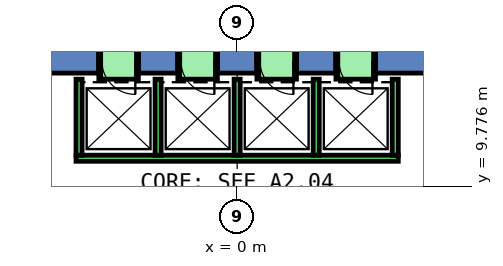
"""IFC4 building model, lengths in metres.
Left out: names, types, materials, properties, quantities, classifications, styles, units other than length and angle.
Written with IfcOpenShell. Run it as: python <this file> out.ifc"""

import sys

from ifc_helpers import new_model, si_unit, direction, frame, frame_2d, origin, place, context, subcontext, project, spatial, polyline, rectangle, outline, extrude, element, fill, save


model = new_model("IFC4")
c1 = context("Model", 3, precision=1e-05, world=origin(), true_north=direction((0.0, 1.0)))
c2 = subcontext(c1, "Body", "Model", "MODEL_VIEW")
j1 = project(units=[si_unit("LENGTHUNIT", "METRE"), si_unit("PLANEANGLEUNIT", "RADIAN")], contexts=[c1])
p1 = place(None, origin())
s1 = spatial("IfcSite", under=j1, at=p1, CompositionType="ELEMENT")
p2 = place(p1, origin())
s2 = spatial("IfcBuilding", under=s1, at=p2, CompositionType="ELEMENT")
p3 = place(p2, origin())
s3 = spatial("IfcBuildingStorey", under=s2, at=p3, CompositionType="ELEMENT", Elevation=0.0)
p4 = place(p3, frame((0.0, 0.0, -0.5)))
e1 = element("IfcWall", 1, at=p4, inside=s3, PredefinedType="SHEAR", context=c2, shape_type="SweptSolid", body=[
    extrude(outline(polyline([(4.55, 14.5), (4.55, 13.5), (6.351, 13.5), (6.928, 14.5), (4.55, 14.5)])), origin(), (0.0, 0.0, 1.0), 9.05),
])
p5 = place(p3, frame((0.0, 0.0, -0.5)))
e2 = element("IfcWall", 2, at=p5, inside=s3, PredefinedType="SHEAR", context=c2, shape_type="SweptSolid", body=[
    extrude(outline(polyline([(1.95, 14.5), (1.95, 13.5), (3.25, 13.5), (3.25, 14.5), (1.95, 14.5)])), origin(), (0.0, 0.0, 1.0), 9.05),
])
p6 = place(p3, frame((0.0, 0.0, -0.5)))
e3 = element("IfcWall", 3, at=p6, inside=s3, PredefinedType="SHEAR", context=c2, shape_type="SweptSolid", body=[
    extrude(outline(polyline([(-0.65, 14.5), (-0.65, 13.5), (0.65, 13.5), (0.65, 14.5), (-0.65, 14.5)])), origin(), (0.0, 0.0, 1.0), 9.05),
])
p7 = place(p3, frame((0.0, 0.0, -0.5)))
e4 = element("IfcWall", 4, at=p7, inside=s3, PredefinedType="SHEAR", context=c2, shape_type="SweptSolid", body=[
    extrude(outline(polyline([(-3.25, 14.5), (-3.25, 13.5), (-1.95, 13.5), (-1.95, 14.5), (-3.25, 14.5)])), origin(), (0.0, 0.0, 1.0), 9.05),
])
p8 = place(p3, frame((0.0, 0.0, -0.5)))
e5 = element("IfcWall", 5, at=p8, inside=s3, PredefinedType="SHEAR", context=c2, shape_type="SweptSolid", body=[
    extrude(outline(polyline([(-4.55, 13.5), (-4.55, 14.5), (-6.928, 14.5), (-6.351, 13.5), (-4.55, 13.5)])), origin(), (0.0, 0.0, 1.0), 9.05),
])
p9 = place(p3, frame((0.0, 0.0, 3.6)))
e6 = element("IfcWall", 6, at=p9, inside=s3, PredefinedType="SHEAR", context=c2, shape_type="SweptSolid", body=[
    extrude(outline(polyline([(3.25, 14.5), (3.25, 13.5), (4.55, 13.5), (4.55, 14.5), (3.25, 14.5)])), origin(), (0.0, 0.0, 1.0), 4.95),
])
p10 = place(p3, frame((0.0, 0.0, 3.6)))
e7 = element("IfcWall", 7, at=p10, inside=s3, PredefinedType="SHEAR", context=c2, shape_type="SweptSolid", body=[
    extrude(outline(polyline([(0.65, 14.5), (0.65, 13.5), (1.95, 13.5), (1.95, 14.5), (0.65, 14.5)])), origin(), (0.0, 0.0, 1.0), 4.95),
])
p11 = place(p3, frame((0.0, 0.0, 3.6)))
e8 = element("IfcWall", 8, at=p11, inside=s3, PredefinedType="SHEAR", context=c2, shape_type="SweptSolid", body=[
    extrude(outline(polyline([(-1.95, 14.5), (-1.95, 13.5), (-0.65, 13.5), (-0.65, 14.5), (-1.95, 14.5)])), origin(), (0.0, 0.0, 1.0), 4.95),
])
p12 = place(p3, frame((0.0, 0.0, 3.6)))
e9 = element("IfcWall", 9, at=p12, inside=s3, PredefinedType="SHEAR", context=c2, shape_type="SweptSolid", body=[
    extrude(outline(polyline([(-4.55, 14.5), (-4.55, 13.5), (-3.25, 13.5), (-3.25, 14.5), (-4.55, 14.5)])), origin(), (0.0, 0.0, 1.0), 4.95),
])
p13 = place(p3, frame((5.3, 10.7, 0.0), z_axis=(0.0, 0.0, 1.0), x_axis=(-1.0, 0.0, 0.0)))
e10 = element("IfcWall", 10, at=p13, inside=s3, PredefinedType="STANDARD", context=c2, shape_type="SweptSolid", body=[
    extrude(rectangle(XDim=10.6, YDim=0.2, at=frame_2d((5.3, 0.0))), origin(), (0.0, 0.0, 1.0), 8.55),
])
for number, where, z_axis, x_axis in (
    (11, (5.2, 10.8, 0.0), (0.0, 0.0, 1.0), (0.0, 1.0, 0.0)),
    (12, (2.6, 10.8, 0.0), (0.0, 0.0, 1.0), (0.0, 1.0, 0.0)),
    (13, (0.0, 10.8, 0.0), (0.0, 0.0, 1.0), (0.0, 1.0, 0.0)),
    (14, (-2.6, 10.8, 0.0), (0.0, 0.0, 1.0), (0.0, 1.0, 0.0)),
    (15, (-5.2, 10.8, 0.0), (0.0, 0.0, 1.0), (0.0, 1.0, 0.0)),
):
    element("IfcWall", number, at=place(p3, frame(where, z_axis=z_axis, x_axis=x_axis)), inside=s3, PredefinedType="STANDARD", context=c2, shape_type="SweptSolid", body=[
        extrude(rectangle(XDim=2.5, YDim=0.2, at=frame_2d((1.25, 0.0))), origin(), (0.0, 0.0, 1.0), 8.55),
    ])
p14 = place(p3, frame((4.55, 13.9, 0.0), z_axis=(0.0, 0.0, 1.0), x_axis=(-1.0, 0.0, 0.0)))
e16 = element("IfcWall", 16, at=p14, inside=s3, PredefinedType="STANDARD", context=c2, shape_type="SweptSolid", body=[
    extrude(rectangle(XDim=1.3, YDim=1.2, at=frame_2d((0.65, 0.0))), origin(), (0.0, 0.0, 1.0), 2.4),
])
p15 = place(p14, frame((0.1, 0.0, 0.0)))
e17 = element("IfcOpeningElement", 17, at=p15, cuts=e16, PredefinedType="OPENING", context=c2, shape_type="SweptSolid", body=[
    extrude(rectangle(XDim=1.1, YDim=2.3, at=frame_2d((0.55, 1.15))), frame((0.0, 0.61, 0.0), z_axis=(0.0, -1.0, 0.0), x_axis=(1.0, 0.0, 0.0)), (0.0, 0.0, 1.0), 1.22),
])
p16 = place(p3, frame((1.95, 13.9, 0.0), z_axis=(0.0, 0.0, 1.0), x_axis=(-1.0, 0.0, 0.0)))
e18 = element("IfcWall", 18, at=p16, inside=s3, PredefinedType="STANDARD", context=c2, shape_type="SweptSolid", body=[
    extrude(rectangle(XDim=1.3, YDim=1.2, at=frame_2d((0.65, 0.0))), origin(), (0.0, 0.0, 1.0), 2.4),
])
p17 = place(p16, frame((0.1, 0.0, 0.0)))
e19 = element("IfcOpeningElement", 19, at=p17, cuts=e18, PredefinedType="OPENING", context=c2, shape_type="SweptSolid", body=[
    extrude(rectangle(XDim=1.1, YDim=2.3, at=frame_2d((0.55, 1.15))), frame((0.0, 0.61, 0.0), z_axis=(0.0, -1.0, 0.0), x_axis=(1.0, 0.0, 0.0)), (0.0, 0.0, 1.0), 1.22),
])
p18 = place(p3, frame((-0.65, 13.9, 0.0), z_axis=(0.0, 0.0, 1.0), x_axis=(-1.0, 0.0, 0.0)))
e20 = element("IfcWall", 20, at=p18, inside=s3, PredefinedType="STANDARD", context=c2, shape_type="SweptSolid", body=[
    extrude(rectangle(XDim=1.3, YDim=1.2, at=frame_2d((0.65, 0.0))), origin(), (0.0, 0.0, 1.0), 2.4),
])
p19 = place(p18, frame((0.1, 0.0, 0.0)))
e21 = element("IfcOpeningElement", 21, at=p19, cuts=e20, PredefinedType="OPENING", context=c2, shape_type="SweptSolid", body=[
    extrude(rectangle(XDim=1.1, YDim=2.3, at=frame_2d((0.55, 1.15))), frame((0.0, 0.61, 0.0), z_axis=(0.0, -1.0, 0.0), x_axis=(1.0, 0.0, 0.0)), (0.0, 0.0, 1.0), 1.22),
])
p20 = place(p3, frame((-3.25, 13.9, 0.0), z_axis=(0.0, 0.0, 1.0), x_axis=(-1.0, 0.0, 0.0)))
e22 = element("IfcWall", 22, at=p20, inside=s3, PredefinedType="STANDARD", context=c2, shape_type="SweptSolid", body=[
    extrude(rectangle(XDim=1.3, YDim=1.2, at=frame_2d((0.65, 0.0))), origin(), (0.0, 0.0, 1.0), 2.4),
])
p21 = place(p20, frame((0.1, 0.0, 0.0)))
e23 = element("IfcOpeningElement", 23, at=p21, cuts=e22, PredefinedType="OPENING", context=c2, shape_type="SweptSolid", body=[
    extrude(rectangle(XDim=1.1, YDim=2.3, at=frame_2d((0.55, 1.15))), frame((0.0, 0.61, 0.0), z_axis=(0.0, -1.0, 0.0), x_axis=(1.0, 0.0, 0.0)), (0.0, 0.0, 1.0), 1.22),
])
p22 = place(p15, origin())
e24 = element("IfcDoor", 24, at=p22, inside=s3, OperationType="SLIDING_TO_LEFT", PredefinedType="DOOR", context=c2, shape_type="SweptSolid", body=[
    extrude(rectangle(XDim=1.1, YDim=2.3, at=frame_2d((0.55, 1.15))), frame((0.0, 0.025, 0.0), z_axis=(0.0, -1.0, 0.0), x_axis=(1.0, 0.0, 0.0)), (0.0, 0.0, 1.0), 0.05),
])
fill(e17, e24)
p23 = place(p17, origin())
e25 = element("IfcDoor", 25, at=p23, inside=s3, OperationType="SLIDING_TO_LEFT", PredefinedType="DOOR", context=c2, shape_type="SweptSolid", body=[
    extrude(rectangle(XDim=1.1, YDim=2.3, at=frame_2d((0.55, 1.15))), frame((0.0, 0.025, 0.0), z_axis=(0.0, -1.0, 0.0), x_axis=(1.0, 0.0, 0.0)), (0.0, 0.0, 1.0), 0.05),
])
fill(e19, e25)
p24 = place(p19, origin())
e26 = element("IfcDoor", 26, at=p24, inside=s3, OperationType="SLIDING_TO_LEFT", PredefinedType="DOOR", context=c2, shape_type="SweptSolid", body=[
    extrude(rectangle(XDim=1.1, YDim=2.3, at=frame_2d((0.55, 1.15))), frame((0.0, 0.025, 0.0), z_axis=(0.0, -1.0, 0.0), x_axis=(1.0, 0.0, 0.0)), (0.0, 0.0, 1.0), 0.05),
])
fill(e21, e26)
p25 = place(p21, origin())
e27 = element("IfcDoor", 27, at=p25, inside=s3, OperationType="SLIDING_TO_LEFT", PredefinedType="DOOR", context=c2, shape_type="SweptSolid", body=[
    extrude(rectangle(XDim=1.1, YDim=2.3, at=frame_2d((0.55, 1.15))), frame((0.0, 0.025, 0.0), z_axis=(0.0, -1.0, 0.0), x_axis=(1.0, 0.0, 0.0)), (0.0, 0.0, 1.0), 0.05),
])
fill(e23, e27)
save(model, sys.argv[1])
